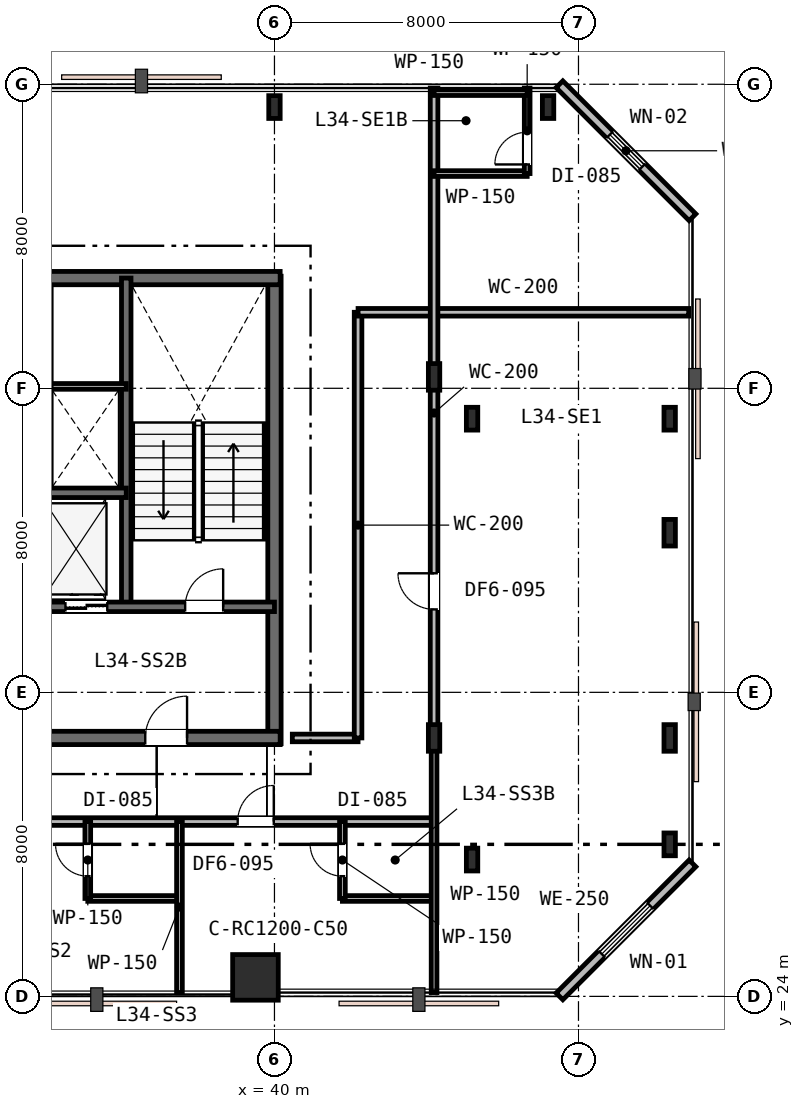
"""IFC4 building model, lengths in metres.
Left out: names, types, materials, properties, quantities, classifications, styles, units other than length and angle.
Written with IfcOpenShell. Run it as: python <this file> out.ifc"""

import sys

from ifc_helpers import new_model, si_unit, direction, frame, frame_2d, origin, origin_2d, place, context, subcontext, project, spatial, rectangle, i_section, extrude, element, fill, save


model = new_model("IFC4")
c1 = context("Model", 3, precision=1e-05, world=origin(), true_north=direction((0.0, 1.0)))
c2 = subcontext(c1, "Body", "Model", "MODEL_VIEW")
j1 = project(units=[si_unit("LENGTHUNIT", "METRE"), si_unit("PLANEANGLEUNIT", "RADIAN")], contexts=[c1])
p1 = place(None, origin())
s1 = spatial("IfcSite", under=j1, at=p1, CompositionType="ELEMENT")
p2 = place(p1, origin())
s2 = spatial("IfcBuilding", under=s1, at=p2, CompositionType="ELEMENT")
p3 = place(p2, frame((0.0, 0.0, 133.2)))
s3 = spatial("IfcBuildingStorey", under=s2, at=p3, CompositionType="ELEMENT", Elevation=133.2)
p4 = place(p3, frame((40.0, 30.65, 0.0), z_axis=(0.0, 0.0, 1.0), x_axis=(0.0, 1.0, 0.0)))
e1 = element("IfcWall", 1, at=p4, inside=s3, PredefinedType="SHEAR", context=c2, shape_type="SweptSolid", body=[
    extrude(rectangle(XDim=12.3, YDim=0.35, at=frame_2d((6.15, 0.0))), origin(), (0.0, 0.0, 1.0), 3.6),
])
p5 = place(p3, frame((15.85, 42.9, 0.0), z_axis=(0.0, 0.0, 1.0), x_axis=(1.0, 0.0, 0.0)))
e2 = element("IfcWall", 2, at=p5, inside=s3, PredefinedType="SHEAR", context=c2, shape_type="SweptSolid", body=[
    extrude(rectangle(XDim=24.3, YDim=0.35, at=frame_2d((12.15, 0.0))), origin(), (0.0, 0.0, 1.0), 3.6),
])
p6 = place(p3, frame((28.95, 30.8, 0.0), z_axis=(0.0, 0.0, 1.0), x_axis=(1.0, 0.0, 0.0)))
e3 = element("IfcWall", 3, at=p6, inside=s3, PredefinedType="SHEAR", context=c2, shape_type="SweptSolid", body=[
    extrude(rectangle(XDim=11.2, YDim=0.35, at=frame_2d((5.6, 0.0))), origin(), (0.0, 0.0, 1.0), 3.6),
])
p7 = place(p6, frame((7.65, 0.0, 0.0)))
e4 = element("IfcOpeningElement", 4, at=p7, cuts=e3, PredefinedType="OPENING", context=c2, shape_type="SweptSolid", body=[
    extrude(rectangle(XDim=1.1, YDim=2.15, at=frame_2d((0.55, 1.075))), frame((0.0, 0.185, 0.0), z_axis=(0.0, -1.0, 0.0), x_axis=(1.0, 0.0, 0.0)), (0.0, 0.0, 1.0), 0.37),
])
p8 = place(p3, frame((36.1, 34.25, 0.0), z_axis=(0.0, 0.0, 1.0), x_axis=(0.0, 1.0, 0.0)))
e5 = element("IfcWall", 5, at=p8, inside=s3, PredefinedType="SHEAR", context=c2, shape_type="SweptSolid", body=[
    extrude(rectangle(XDim=8.65, YDim=0.25, at=frame_2d((4.325, 0.0))), origin(), (0.0, 0.0, 1.0), 3.6),
])
p9 = place(p3, frame((33.95, 34.25, 0.0), z_axis=(0.0, 0.0, 1.0), x_axis=(1.0, 0.0, 0.0)))
e6 = element("IfcWall", 6, at=p9, inside=s3, PredefinedType="SHEAR", context=c2, shape_type="SweptSolid", body=[
    extrude(rectangle(XDim=6.05, YDim=0.25, at=frame_2d((3.025, 0.0))), origin(), (0.0, 0.0, 1.0), 3.6),
])
p10 = place(p9, frame((3.7, 0.0, 0.0)))
e7 = element("IfcOpeningElement", 7, at=p10, cuts=e6, PredefinedType="OPENING", context=c2, shape_type="SweptSolid", body=[
    extrude(rectangle(XDim=1.0, YDim=2.15, at=frame_2d((0.5, 1.075))), frame((0.0, 0.135, 0.0), z_axis=(0.0, -1.0, 0.0), x_axis=(1.0, 0.0, 0.0)), (0.0, 0.0, 1.0), 0.27),
])
p11 = place(p9, frame((0.55, 0.0, 0.0)))
e8 = element("IfcOpeningElement", 8, at=p11, cuts=e6, PredefinedType="OPENING", context=c2, shape_type="SweptSolid", body=[
    extrude(rectangle(XDim=1.1, YDim=2.15, at=frame_2d((0.55, 1.075))), frame((0.0, 0.135, 0.0), z_axis=(0.0, -1.0, 0.0), x_axis=(1.0, 0.0, 0.0)), (0.0, 0.0, 1.0), 0.27),
])
p12 = place(p3, frame((19.9, 37.25, 0.0), z_axis=(0.0, 0.0, 1.0), x_axis=(1.0, 0.0, 0.0)))
e9 = element("IfcWall", 9, at=p12, inside=s3, PredefinedType="SHEAR", context=c2, shape_type="SweptSolid", body=[
    extrude(rectangle(XDim=16.2, YDim=0.25, at=frame_2d((8.1, 0.0))), origin(), (0.0, 0.0, 1.0), 3.6),
])
p13 = place(p12, frame((12.55, 0.0, 0.0)))
e10 = element("IfcOpeningElement", 10, at=p13, cuts=e9, PredefinedType="OPENING", context=c2, shape_type="SweptSolid", body=[
    extrude(rectangle(XDim=0.9, YDim=2.15, at=frame_2d((0.45, 1.075))), frame((0.0, 0.135, 0.0), z_axis=(0.0, -1.0, 0.0), x_axis=(1.0, 0.0, 0.0)), (0.0, 0.0, 1.0), 0.27),
])
p14 = place(p3, frame((39.5, 24.5, 0.0), z_axis=(0.0, 0.0, 1.0), x_axis=(1.0, 0.0, 0.0)))
e11 = element("IfcColumn", 11, at=p14, inside=s3, PredefinedType="COLUMN", context=c2, shape_type="SweptSolid", body=[
    extrude(rectangle(XDim=1.2, YDim=1.2, at=origin_2d()), origin(), (0.0, 0.0, 1.0), 3.6),
])
for number, where, z_axis, x_axis in (
    (12, (45.2, 27.6, 0.0), (0.0, 0.0, 1.0), (1.0, 0.0, 0.0)),
    (13, (45.2, 39.2, 0.0), (0.0, 0.0, 1.0), (1.0, 0.0, 0.0)),
    (14, (40.0, 47.4, 0.0), (0.0, 0.0, 1.0), (1.0, 0.0, 0.0)),
    (15, (47.2, 47.4, 0.0), (0.0, 0.0, 1.0), (1.0, 0.0, 0.0)),
    (16, (50.4, 28.0, 0.0), (0.0, 0.0, 1.0), (1.0, 0.0, 0.0)),
    (17, (50.4, 39.2, 0.0), (0.0, 0.0, 1.0), (1.0, 0.0, 0.0)),
):
    element("IfcColumn", number, at=place(p3, frame(where, z_axis=z_axis, x_axis=x_axis)), inside=s3, PredefinedType="COLUMN", context=c2, shape_type="SweptSolid", body=[
        extrude(i_section(OverallWidth=0.3, OverallDepth=0.6, WebThickness=0.015, FlangeThickness=0.03, FilletRadius=0.027, at=origin_2d()), origin(), (0.0, 0.0, 1.0), 3.6),
    ])
for number, where, z_axis, x_axis in (
    (18, (44.2, 30.8, 0.0), (0.0, 0.0, 1.0), (1.0, 0.0, 0.0)),
    (19, (44.2, 40.3, 0.0), (0.0, 0.0, 1.0), (1.0, 0.0, 0.0)),
    (20, (50.4, 30.8, 0.0), (0.0, 0.0, 1.0), (1.0, 0.0, 0.0)),
    (21, (50.4, 36.2, 0.0), (0.0, 0.0, 1.0), (1.0, 0.0, 0.0)),
):
    element("IfcColumn", number, at=place(p3, frame(where, z_axis=z_axis, x_axis=x_axis)), inside=s3, PredefinedType="COLUMN", context=c2, shape_type="SweptSolid", body=[
        extrude(i_section(OverallWidth=0.3, OverallDepth=0.7, WebThickness=0.017, FlangeThickness=0.032, FilletRadius=0.027, at=origin_2d()), origin(), (0.0, 0.0, 1.0), 3.6),
    ])
p15 = place(p3, frame((47.5, 24.0, 0.0), z_axis=(0.0, 0.0, 1.0), x_axis=(0.707106781187, 0.707106781187, 0.0)))
e22 = element("IfcWall", 22, at=p15, inside=s3, PredefinedType="STANDARD", context=c2, shape_type="SweptSolid", body=[
    extrude(rectangle(XDim=4.95, YDim=0.25, at=frame_2d((2.475, 0.0))), origin(), (0.0, 0.0, 1.0), 3.33),
])
p16 = place(p15, frame((1.575, 0.0, 0.75)))
e23 = element("IfcOpeningElement", 23, at=p16, cuts=e22, PredefinedType="OPENING", context=c2, shape_type="SweptSolid", body=[
    extrude(rectangle(XDim=1.8, YDim=1.85, at=frame_2d((0.9, 0.925))), frame((0.0, 0.135, 0.0), z_axis=(0.0, -1.0, 0.0), x_axis=(1.0, 0.0, 0.0)), (0.0, 0.0, 1.0), 0.27),
])
p17 = place(p3, frame((51.0, 44.5, 0.0), z_axis=(0.0, 0.0, 1.0), x_axis=(-0.707106781187, 0.707106781187, 0.0)))
e24 = element("IfcWall", 24, at=p17, inside=s3, PredefinedType="STANDARD", context=c2, shape_type="SweptSolid", body=[
    extrude(rectangle(XDim=4.95, YDim=0.25, at=frame_2d((2.475, 0.0))), origin(), (0.0, 0.0, 1.0), 3.33),
])
p18 = place(p17, frame((1.875, 0.0, 0.85)))
e25 = element("IfcOpeningElement", 25, at=p18, cuts=e24, PredefinedType="OPENING", context=c2, shape_type="SweptSolid", body=[
    extrude(rectangle(XDim=1.2, YDim=1.6, at=frame_2d((0.6, 0.8))), frame((0.0, 0.135, 0.0), z_axis=(0.0, -1.0, 0.0), x_axis=(1.0, 0.0, 0.0)), (0.0, 0.0, 1.0), 0.27),
])
p19 = place(p3, frame((34.05, 40.05, 0.0), z_axis=(0.0, 0.0, 1.0), x_axis=(1.0, 0.0, 0.0)))
e26 = element("IfcWall", 26, at=p19, inside=s3, PredefinedType="PARTITIONING", context=c2, shape_type="SweptSolid", body=[
    extrude(rectangle(XDim=2.05, YDim=0.15, at=frame_2d((1.025, 0.0))), origin(), (0.0, 0.0, 1.0), 3.33),
])
p20 = place(p3, frame((19.0, 28.6, 0.0), z_axis=(0.0, 0.0, 1.0), x_axis=(1.0, 0.0, 0.0)))
e27 = element("IfcWall", 27, at=p20, inside=s3, PredefinedType="PARTITIONING", context=c2, shape_type="SweptSolid", body=[
    extrude(rectangle(XDim=25.2, YDim=0.2, at=frame_2d((12.6, 0.0))), origin(), (0.0, 0.0, 1.0), 2.93),
])
p21 = place(p20, frame((6.561, 0.0, 0.0)))
e28 = element("IfcOpeningElement", 28, at=p21, cuts=e27, PredefinedType="OPENING", context=c2, shape_type="SweptSolid", body=[
    extrude(rectangle(XDim=0.95, YDim=2.15, at=frame_2d((0.475, 1.075))), frame((0.0, 0.11, 0.0), z_axis=(0.0, -1.0, 0.0), x_axis=(1.0, 0.0, 0.0)), (0.0, 0.0, 1.0), 0.22),
])
p22 = place(p20, frame((13.332, 0.0, 0.0)))
e29 = element("IfcOpeningElement", 29, at=p22, cuts=e27, PredefinedType="OPENING", context=c2, shape_type="SweptSolid", body=[
    extrude(rectangle(XDim=0.95, YDim=2.15, at=frame_2d((0.475, 1.075))), frame((0.0, 0.11, 0.0), z_axis=(0.0, -1.0, 0.0), x_axis=(1.0, 0.0, 0.0)), (0.0, 0.0, 1.0), 0.22),
])
p23 = place(p20, frame((20.032, 0.0, 0.0)))
e30 = element("IfcOpeningElement", 30, at=p23, cuts=e27, PredefinedType="OPENING", context=c2, shape_type="SweptSolid", body=[
    extrude(rectangle(XDim=0.95, YDim=2.15, at=frame_2d((0.475, 1.075))), frame((0.0, 0.11, 0.0), z_axis=(0.0, -1.0, 0.0), x_axis=(1.0, 0.0, 0.0)), (0.0, 0.0, 1.0), 0.22),
])
p24 = place(p3, frame((40.47, 30.8, 0.0), z_axis=(0.0, 0.0, 1.0), x_axis=(1.0, 0.0, 0.0)))
e31 = element("IfcWall", 31, at=p24, inside=s3, PredefinedType="PARTITIONING", context=c2, shape_type="SweptSolid", body=[
    extrude(rectangle(XDim=1.73, YDim=0.2, at=frame_2d((0.865, 0.0))), origin(), (0.0, 0.0, 1.0), 2.93),
])
p25 = place(p3, frame((42.2, 30.8, 0.0), z_axis=(0.0, 0.0, 1.0), x_axis=(0.0, 1.0, 0.0)))
e32 = element("IfcWall", 32, at=p25, inside=s3, PredefinedType="PARTITIONING", context=c2, shape_type="SweptSolid", body=[
    extrude(rectangle(XDim=11.2, YDim=0.2, at=frame_2d((5.6, 0.0))), origin(), (0.0, 0.0, 1.0), 2.93),
])
p26 = place(p3, frame((42.2, 42.0, 0.0), z_axis=(0.0, 0.0, 1.0), x_axis=(1.0, 0.0, 0.0)))
e33 = element("IfcWall", 33, at=p26, inside=s3, PredefinedType="PARTITIONING", context=c2, shape_type="SweptSolid", body=[
    extrude(rectangle(XDim=8.7, YDim=0.2, at=frame_2d((4.35, 0.0))), origin(), (0.0, 0.0, 1.0), 3.33),
])
p27 = place(p3, frame((35.088, 26.576, 0.0), z_axis=(0.0, 0.0, 1.0), x_axis=(1.0, 0.0, 0.0)))
e34 = element("IfcWall", 34, at=p27, inside=s3, PredefinedType="PARTITIONING", context=c2, shape_type="SweptSolid", body=[
    extrude(rectangle(XDim=2.412, YDim=0.15, at=frame_2d((1.206, 0.0))), origin(), (0.0, 0.0, 1.0), 2.96),
])
p28 = place(p3, frame((35.088, 26.576, 0.0), z_axis=(0.0, 0.0, 1.0), x_axis=(0.0, 1.0, 0.0)))
e35 = element("IfcWall", 35, at=p28, inside=s3, PredefinedType="PARTITIONING", context=c2, shape_type="SweptSolid", body=[
    extrude(rectangle(XDim=2.024, YDim=0.15, at=frame_2d((1.012, 0.0))), origin(), (0.0, 0.0, 1.0), 3.33),
])
p29 = place(p28, frame((0.587, 0.0, 0.0)))
e36 = element("IfcOpeningElement", 36, at=p29, cuts=e35, PredefinedType="OPENING", context=c2, shape_type="SweptSolid", body=[
    extrude(rectangle(XDim=0.85, YDim=2.15, at=frame_2d((0.425, 1.075))), frame((0.0, 0.085, 0.0), z_axis=(0.0, -1.0, 0.0), x_axis=(1.0, 0.0, 0.0)), (0.0, 0.0, 1.0), 0.17),
])
p30 = place(p3, frame((37.5, 28.6, 0.0), z_axis=(0.0, 0.0, 1.0), x_axis=(0.0, -1.0, 0.0)))
e37 = element("IfcWall", 37, at=p30, inside=s3, PredefinedType="PARTITIONING", context=c2, shape_type="SweptSolid", body=[
    extrude(rectangle(XDim=4.5, YDim=0.15, at=frame_2d((2.25, 0.0))), origin(), (0.0, 0.0, 1.0), 2.96),
])
p31 = place(p3, frame((41.788, 26.576, 0.0), z_axis=(0.0, 0.0, 1.0), x_axis=(1.0, 0.0, 0.0)))
e38 = element("IfcWall", 38, at=p31, inside=s3, PredefinedType="PARTITIONING", context=c2, shape_type="SweptSolid", body=[
    extrude(rectangle(XDim=2.412, YDim=0.15, at=frame_2d((1.206, 0.0))), origin(), (0.0, 0.0, 1.0), 3.33),
])
p32 = place(p3, frame((41.788, 26.576, 0.0), z_axis=(0.0, 0.0, 1.0), x_axis=(0.0, 1.0, 0.0)))
e39 = element("IfcWall", 39, at=p32, inside=s3, PredefinedType="PARTITIONING", context=c2, shape_type="SweptSolid", body=[
    extrude(rectangle(XDim=2.024, YDim=0.15, at=frame_2d((1.012, 0.0))), origin(), (0.0, 0.0, 1.0), 3.33),
])
p33 = place(p32, frame((0.587, 0.0, 0.0)))
e40 = element("IfcOpeningElement", 40, at=p33, cuts=e39, PredefinedType="OPENING", context=c2, shape_type="SweptSolid", body=[
    extrude(rectangle(XDim=0.85, YDim=2.15, at=frame_2d((0.425, 1.075))), frame((0.0, 0.085, 0.0), z_axis=(0.0, -1.0, 0.0), x_axis=(1.0, 0.0, 0.0)), (0.0, 0.0, 1.0), 0.17),
])
p34 = place(p3, frame((44.2, 30.8, 0.0), z_axis=(0.0, 0.0, 1.0), x_axis=(0.0, -1.0, 0.0)))
e41 = element("IfcWall", 41, at=p34, inside=s3, PredefinedType="PARTITIONING", context=c2, shape_type="SweptSolid", body=[
    extrude(rectangle(XDim=6.7, YDim=0.15, at=frame_2d((3.35, 0.0))), origin(), (0.0, 0.0, 1.0), 2.93),
])
p35 = place(p3, frame((44.2, 30.8, 0.0), z_axis=(0.0, 0.0, 1.0), x_axis=(0.0, 1.0, 0.0)))
e42 = element("IfcWall", 42, at=p35, inside=s3, PredefinedType="PARTITIONING", context=c2, shape_type="SweptSolid", body=[
    extrude(rectangle(XDim=17.1, YDim=0.2, at=frame_2d((8.55, 0.0))), origin(), (0.0, 0.0, 1.0), 2.93),
])
p36 = place(p35, frame((3.382, 0.0, 0.0)))
e43 = element("IfcOpeningElement", 43, at=p36, cuts=e42, PredefinedType="OPENING", context=c2, shape_type="SweptSolid", body=[
    extrude(rectangle(XDim=0.95, YDim=2.15, at=frame_2d((0.475, 1.075))), frame((0.0, 0.11, 0.0), z_axis=(0.0, -1.0, 0.0), x_axis=(1.0, 0.0, 0.0)), (0.0, 0.0, 1.0), 0.22),
])
p37 = place(p3, frame((44.2, 45.65, 0.0), z_axis=(0.0, 0.0, 1.0), x_axis=(1.0, 0.0, 0.0)))
e44 = element("IfcWall", 44, at=p37, inside=s3, PredefinedType="PARTITIONING", context=c2, shape_type="SweptSolid", body=[
    extrude(rectangle(XDim=2.45, YDim=0.15, at=frame_2d((1.225, 0.0))), origin(), (0.0, 0.0, 1.0), 3.33),
])
p38 = place(p3, frame((46.65, 45.65, 0.0), z_axis=(0.0, 0.0, 1.0), x_axis=(0.0, 1.0, 0.0)))
e45 = element("IfcWall", 45, at=p38, inside=s3, PredefinedType="PARTITIONING", context=c2, shape_type="SweptSolid", body=[
    extrude(rectangle(XDim=2.25, YDim=0.15, at=frame_2d((1.125, 0.0))), origin(), (0.0, 0.0, 1.0), 3.01),
])
p39 = place(p38, frame((0.24, 0.0, 0.0)))
e46 = element("IfcOpeningElement", 46, at=p39, cuts=e45, PredefinedType="OPENING", context=c2, shape_type="SweptSolid", body=[
    extrude(rectangle(XDim=0.85, YDim=2.15, at=frame_2d((0.425, 1.075))), frame((0.0, 0.085, 0.0), z_axis=(0.0, -1.0, 0.0), x_axis=(1.0, 0.0, 0.0)), (0.0, 0.0, 1.0), 0.17),
])
p40 = place(p3, frame((44.2, 47.78, 0.0), z_axis=(0.0, 0.0, 1.0), x_axis=(1.0, 0.0, 0.0)))
e47 = element("IfcWall", 47, at=p40, inside=s3, PredefinedType="PARTITIONING", context=c2, shape_type="SweptSolid", body=[
    extrude(rectangle(XDim=2.45, YDim=0.15, at=frame_2d((1.225, 0.0))), origin(), (0.0, 0.0, 1.0), 3.01),
])
p41 = place(p16, origin())
e48 = element("IfcWindow", 48, at=p41, inside=s3, PartitioningType="SINGLE_PANEL", PredefinedType="WINDOW", context=c2, shape_type="SweptSolid", body=[
    extrude(rectangle(XDim=1.8, YDim=1.85, at=frame_2d((0.9, 0.925))), frame((0.0, 0.03, 0.0), z_axis=(0.0, -1.0, 0.0), x_axis=(1.0, 0.0, 0.0)), (0.0, 0.0, 1.0), 0.06),
])
fill(e23, e48)
p42 = place(p18, origin())
e49 = element("IfcWindow", 49, at=p42, inside=s3, PartitioningType="SINGLE_PANEL", PredefinedType="WINDOW", context=c2, shape_type="SweptSolid", body=[
    extrude(rectangle(XDim=1.2, YDim=1.6, at=frame_2d((0.6, 0.8))), frame((0.0, 0.03, 0.0), z_axis=(0.0, -1.0, 0.0), x_axis=(1.0, 0.0, 0.0)), (0.0, 0.0, 1.0), 0.06),
])
fill(e25, e49)
p43 = place(p10, origin())
e50 = element("IfcDoor", 50, at=p43, inside=s3, OperationType="SINGLE_SWING_RIGHT", PredefinedType="DOOR", context=c2, shape_type="SweptSolid", body=[
    extrude(rectangle(XDim=1.0, YDim=2.15, at=frame_2d((0.5, 1.075))), frame((0.0, 0.025, 0.0), z_axis=(0.0, -1.0, 0.0), x_axis=(1.0, 0.0, 0.0)), (0.0, 0.0, 1.0), 0.05),
])
fill(e7, e50)
p44 = place(p7, origin())
e51 = element("IfcDoor", 51, at=p44, inside=s3, OperationType="SINGLE_SWING_RIGHT", PredefinedType="DOOR", context=c2, shape_type="SweptSolid", body=[
    extrude(rectangle(XDim=1.1, YDim=2.15, at=frame_2d((0.55, 1.075))), frame((0.0, 0.025, 0.0), z_axis=(0.0, -1.0, 0.0), x_axis=(1.0, 0.0, 0.0)), (0.0, 0.0, 1.0), 0.05),
])
fill(e4, e51)
p45 = place(p29, origin())
e52 = element("IfcDoor", 52, at=p45, inside=s3, OperationType="SINGLE_SWING_RIGHT", PredefinedType="DOOR", context=c2, shape_type="SweptSolid", body=[
    extrude(rectangle(XDim=0.85, YDim=2.15, at=frame_2d((0.425, 1.075))), frame((0.0, 0.025, 0.0), z_axis=(0.0, -1.0, 0.0), x_axis=(1.0, 0.0, 0.0)), (0.0, 0.0, 1.0), 0.05),
])
fill(e36, e52)
p46 = place(p23, origin())
e53 = element("IfcDoor", 53, at=p46, inside=s3, OperationType="SINGLE_SWING_RIGHT", PredefinedType="DOOR", context=c2, shape_type="SweptSolid", body=[
    extrude(rectangle(XDim=0.95, YDim=2.15, at=frame_2d((0.475, 1.075))), frame((0.0, 0.025, 0.0), z_axis=(0.0, -1.0, 0.0), x_axis=(1.0, 0.0, 0.0)), (0.0, 0.0, 1.0), 0.05),
])
fill(e30, e53)
p47 = place(p33, origin())
e54 = element("IfcDoor", 54, at=p47, inside=s3, OperationType="SINGLE_SWING_RIGHT", PredefinedType="DOOR", context=c2, shape_type="SweptSolid", body=[
    extrude(rectangle(XDim=0.85, YDim=2.15, at=frame_2d((0.425, 1.075))), frame((0.0, 0.025, 0.0), z_axis=(0.0, -1.0, 0.0), x_axis=(1.0, 0.0, 0.0)), (0.0, 0.0, 1.0), 0.05),
])
fill(e40, e54)
p48 = place(p36, origin())
e55 = element("IfcDoor", 55, at=p48, inside=s3, OperationType="SINGLE_SWING_RIGHT", PredefinedType="DOOR", context=c2, shape_type="SweptSolid", body=[
    extrude(rectangle(XDim=0.95, YDim=2.15, at=frame_2d((0.475, 1.075))), frame((0.0, 0.025, 0.0), z_axis=(0.0, -1.0, 0.0), x_axis=(1.0, 0.0, 0.0)), (0.0, 0.0, 1.0), 0.05),
])
fill(e43, e55)
p49 = place(p39, origin())
e56 = element("IfcDoor", 56, at=p49, inside=s3, OperationType="SINGLE_SWING_LEFT", PredefinedType="DOOR", context=c2, shape_type="SweptSolid", body=[
    extrude(rectangle(XDim=0.85, YDim=2.15, at=frame_2d((0.425, 1.075))), frame((0.0, 0.025, 0.0), z_axis=(0.0, -1.0, 0.0), x_axis=(1.0, 0.0, 0.0)), (0.0, 0.0, 1.0), 0.05),
])
fill(e46, e56)
p50 = place(p11, origin())
e57 = element("IfcDoor", 57, at=p50, inside=s3, OperationType="DOUBLE_DOOR_SLIDING", PredefinedType="DOOR", context=c2, shape_type="SweptSolid", body=[
    extrude(rectangle(XDim=1.1, YDim=2.15, at=frame_2d((0.55, 1.075))), frame((0.0, 0.025, 0.0), z_axis=(0.0, -1.0, 0.0), x_axis=(1.0, 0.0, 0.0)), (0.0, 0.0, 1.0), 0.05),
])
fill(e8, e57)
save(model, sys.argv[1])
